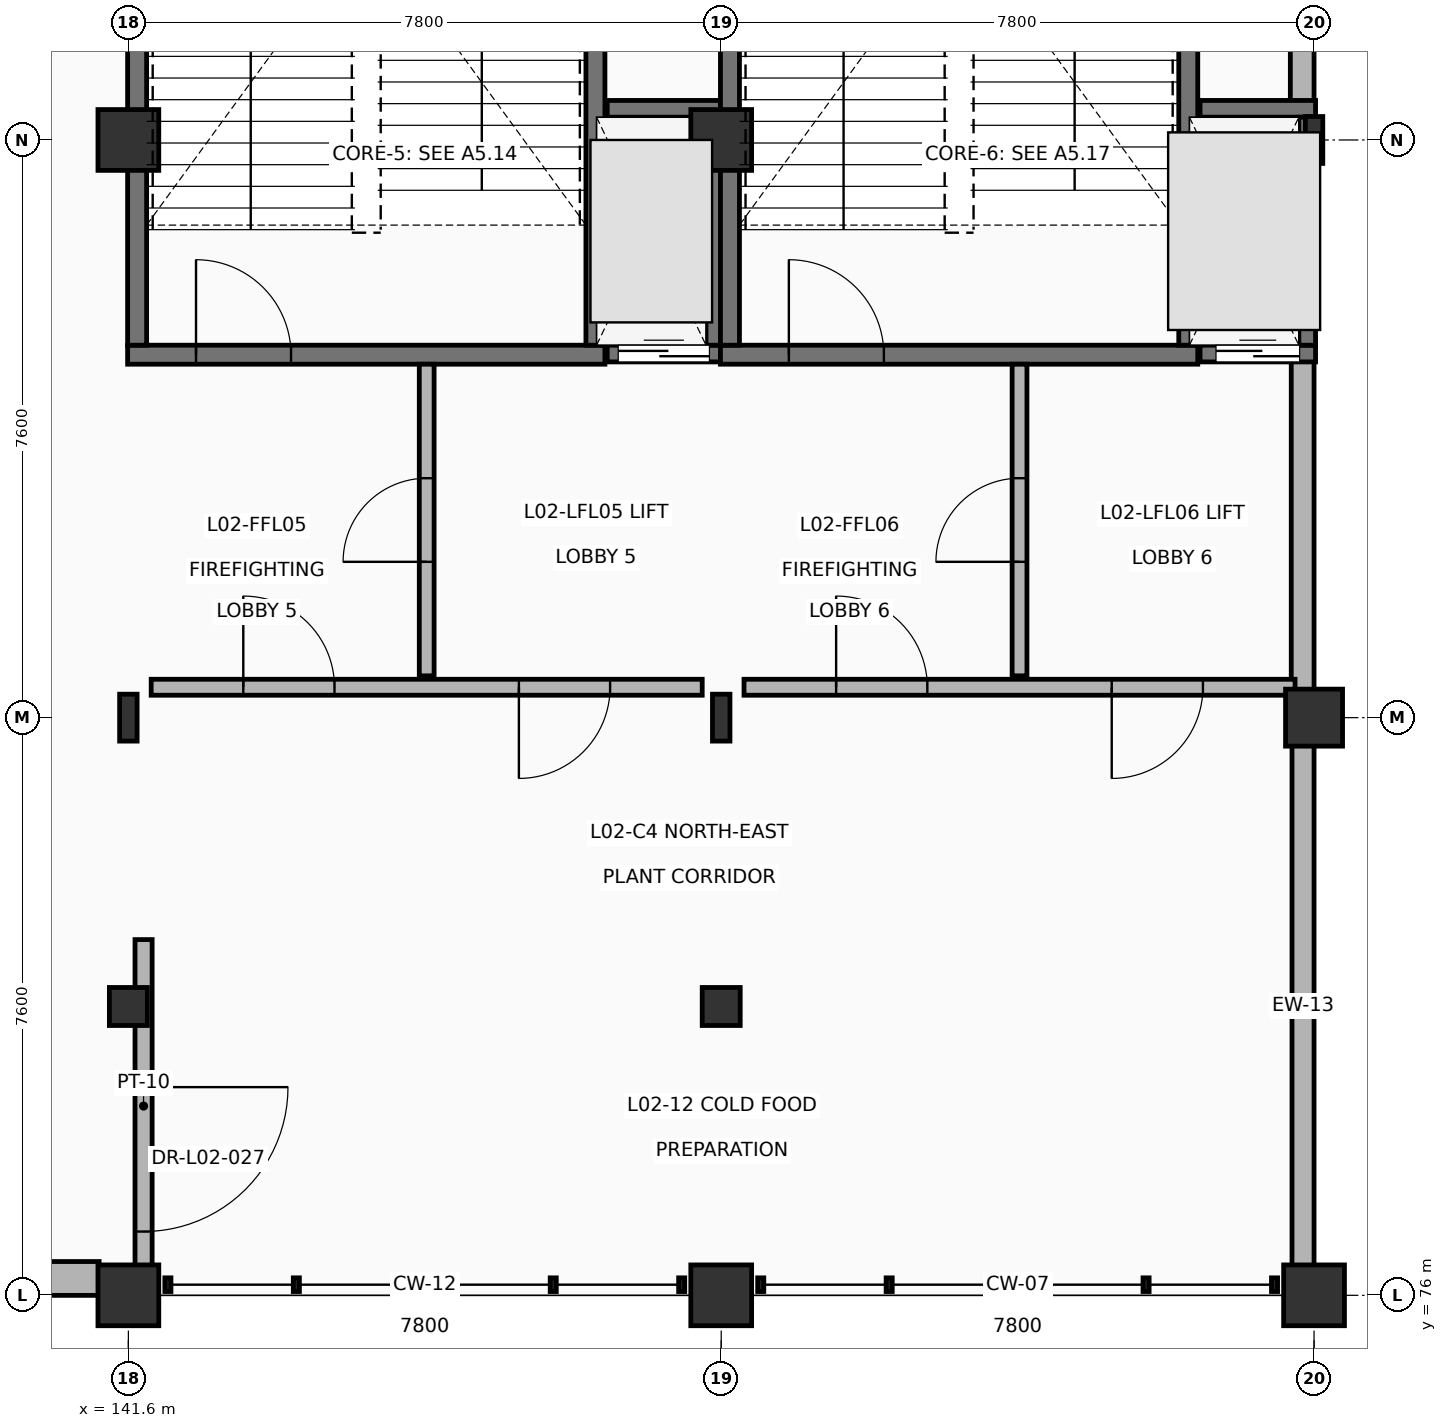
"""IFC4 building model, lengths in metres.
Left out: names, types, materials, properties, quantities, classifications, styles, units other than length and angle.
Written with IfcOpenShell. Run it as: python <this file> out.ifc"""

import sys

from ifc_helpers import new_model, si_unit, direction, frame, frame_2d, origin, origin_2d, place, context, subcontext, project, spatial, rectangle, circle, i_section, extrude, element, fill, save


model = new_model("IFC4")
c1 = context("Model", 3, precision=1e-05, world=origin(), true_north=direction((0.0, 1.0)))
c2 = subcontext(c1, "Body", "Model", "MODEL_VIEW")
j1 = project(units=[si_unit("LENGTHUNIT", "METRE"), si_unit("PLANEANGLEUNIT", "RADIAN")], contexts=[c1])
p1 = place(None, origin())
s1 = spatial("IfcSite", under=j1, at=p1, CompositionType="ELEMENT")
p2 = place(p1, origin())
s2 = spatial("IfcBuilding", under=s1, at=p2, CompositionType="ELEMENT")
p3 = place(p2, frame((0.0, 0.0, 5.4)))
s3 = spatial("IfcBuildingStorey", under=s2, at=p3, CompositionType="ELEMENT", Elevation=5.4)
p4 = place(p3, frame((141.6, 76.0, 0.0), z_axis=(0.0, 0.0, 1.0), x_axis=(1.0, 0.0, 0.0)))
e1 = element("IfcColumn", 1, at=p4, inside=s3, PredefinedType="COLUMN", context=c2, shape_type="SweptSolid", body=[
    extrude(rectangle(XDim=0.8, YDim=0.8, at=origin_2d()), origin(), (0.0, 0.0, 1.0), 5.1),
])
p5 = place(p3, frame((141.6, 83.6, 0.0), z_axis=(0.0, 0.0, 1.0), x_axis=(1.0, 0.0, 0.0)))
e2 = element("IfcColumn", 2, at=p5, inside=s3, PredefinedType="COLUMN", context=c2, shape_type="SweptSolid", body=[
    extrude(i_section(OverallWidth=0.23, OverallDepth=0.617, WebThickness=0.013, FlangeThickness=0.022, at=origin_2d()), origin(), (0.0, 0.0, 1.0), 5.1),
])
for number, where, z_axis, x_axis in (
    (3, (141.6, 91.2, 0.0), (0.0, 0.0, 1.0), (1.0, 0.0, 0.0)),
    (4, (149.4, 76.0, 0.0), (0.0, 0.0, 1.0), (1.0, 0.0, 0.0)),
):
    element("IfcColumn", number, at=place(p3, frame(where, z_axis=z_axis, x_axis=x_axis)), inside=s3, PredefinedType="COLUMN", context=c2, shape_type="SweptSolid", body=[
        extrude(rectangle(XDim=0.8, YDim=0.8, at=origin_2d()), origin(), (0.0, 0.0, 1.0), 5.1),
    ])
p6 = place(p3, frame((149.4, 83.6, 0.0), z_axis=(0.0, 0.0, 1.0), x_axis=(1.0, 0.0, 0.0)))
e5 = element("IfcColumn", 5, at=p6, inside=s3, PredefinedType="COLUMN", context=c2, shape_type="SweptSolid", body=[
    extrude(i_section(OverallWidth=0.23, OverallDepth=0.617, WebThickness=0.013, FlangeThickness=0.022, at=origin_2d()), origin(), (0.0, 0.0, 1.0), 5.1),
])
for number, where, z_axis, x_axis in (
    (6, (149.4, 91.2, 0.0), (0.0, 0.0, 1.0), (1.0, 0.0, 0.0)),
    (7, (157.2, 76.0, 0.0), (0.0, 0.0, 1.0), (1.0, 0.0, 0.0)),
):
    element("IfcColumn", number, at=place(p3, frame(where, z_axis=z_axis, x_axis=x_axis)), inside=s3, PredefinedType="COLUMN", context=c2, shape_type="SweptSolid", body=[
        extrude(rectangle(XDim=0.8, YDim=0.8, at=origin_2d()), origin(), (0.0, 0.0, 1.0), 5.1),
    ])
p7 = place(p3, frame((157.2, 83.6, 0.0), z_axis=(0.0, 0.0, 1.0), x_axis=(1.0, 0.0, 0.0)))
e8 = element("IfcColumn", 8, at=p7, inside=s3, PredefinedType="COLUMN", context=c2, shape_type="SweptSolid", body=[
    extrude(circle(Radius=0.375, at=origin_2d()), origin(), (0.0, 0.0, 1.0), 5.1),
])
p8 = place(p3, frame((157.2, 91.2, 0.0), z_axis=(0.0, 0.0, 1.0), x_axis=(1.0, 0.0, 0.0)))
e9 = element("IfcColumn", 9, at=p8, inside=s3, PredefinedType="COLUMN", context=c2, shape_type="SweptSolid", body=[
    extrude(i_section(OverallWidth=0.23, OverallDepth=0.617, WebThickness=0.013, FlangeThickness=0.022, at=origin_2d()), origin(), (0.0, 0.0, 1.0), 5.1),
])
for number, where, z_axis, x_axis in (
    (10, (141.6, 79.8, 0.0), (0.0, 0.0, 1.0), (1.0, 0.0, 0.0)),
    (11, (149.4, 79.8, 0.0), (0.0, 0.0, 1.0), (1.0, 0.0, 0.0)),
):
    element("IfcColumn", number, at=place(p3, frame(where, z_axis=z_axis, x_axis=x_axis)), inside=s3, PredefinedType="COLUMN", context=c2, shape_type="SweptSolid", body=[
        extrude(rectangle(XDim=0.5, YDim=0.5, at=origin_2d()), origin(), (0.0, 0.0, 1.0), 4.82),
    ])
p9 = place(p3, frame((157.044, 98.015, 0.0), z_axis=(0.0, 0.0, 1.0), x_axis=(0.0, -1.0, 0.0)))
e12 = element("IfcWall", 12, at=p9, inside=s3, PredefinedType="SOLIDWALL", context=c2, shape_type="SweptSolid", body=[
    extrude(rectangle(XDim=6.335, YDim=0.312, at=frame_2d((3.167, 0.0))), origin(), (0.0, 0.0, 1.0), 4.198),
])
p10 = place(p3, frame((157.05, 88.32, 0.0), z_axis=(0.0, 0.0, 1.0), x_axis=(0.0, -1.0, 0.0)))
e13 = element("IfcWall", 13, at=p10, inside=s3, PredefinedType="SOLIDWALL", context=c2, shape_type="SweptSolid", body=[
    extrude(rectangle(XDim=4.36, YDim=0.3, at=frame_2d((2.18, 0.0))), origin(), (0.0, 0.0, 1.0), 4.198),
])
p11 = place(p3, frame((157.055, 83.24, 0.0), z_axis=(0.0, 0.0, 1.0), x_axis=(0.0, -1.0, 0.0)))
e14 = element("IfcWall", 14, at=p11, inside=s3, PredefinedType="SOLIDWALL", context=c2, shape_type="SweptSolid", body=[
    extrude(rectangle(XDim=6.855, YDim=0.29, at=frame_2d((3.427, 0.0))), origin(), (0.0, 0.0, 1.0), 4.198),
])
p12 = place(p3, frame((141.215, 76.222, 0.0), z_axis=(0.0, 0.0, 1.0), x_axis=(-1.0, 0.0, 0.0)))
e15 = element("IfcWall", 15, at=p12, inside=s3, PredefinedType="SOLIDWALL", context=c2, shape_type="SweptSolid", body=[
    extrude(rectangle(XDim=7.03, YDim=0.445, at=frame_2d((3.515, 0.0))), origin(), (0.0, 0.0, 1.0), 4.565),
])
p13 = place(p12, frame((2.015, 0.0, 0.95)))
e16 = element("IfcOpeningElement", 16, at=p13, cuts=e15, PredefinedType="OPENING", context=c2, shape_type="SweptSolid", body=[
    extrude(rectangle(XDim=3.0, YDim=2.2, at=frame_2d((1.5, 1.1))), frame((0.0, 0.232, 0.0), z_axis=(0.0, -1.0, 0.0), x_axis=(1.0, 0.0, 0.0)), (0.0, 0.0, 1.0), 0.465),
])
p14 = place(p3, frame((141.59, 88.375, 0.0), z_axis=(0.0, 0.0, 1.0), x_axis=(1.0, 0.0, 0.0)))
e17 = element("IfcWall", 17, at=p14, inside=s3, PredefinedType="SHEAR", context=c2, shape_type="SweptSolid", body=[
    extrude(rectangle(XDim=6.28, YDim=0.25, at=frame_2d((3.14, 0.0))), origin(), (0.0, 0.0, 1.0), 4.82),
])
p15 = place(p14, frame((0.9, 0.0, 0.0)))
e18 = element("IfcOpeningElement", 18, at=p15, cuts=e17, PredefinedType="OPENING", context=c2, shape_type="SweptSolid", body=[
    extrude(rectangle(XDim=1.25, YDim=2.2, at=frame_2d((0.625, 1.1))), frame((0.0, 0.135, 0.0), z_axis=(0.0, -1.0, 0.0), x_axis=(1.0, 0.0, 0.0)), (0.0, 0.0, 1.0), 0.27),
])
for number, where, z_axis, x_axis in (
    (19, (141.715, 88.5, 0.0), (0.0, 0.0, 1.0), (0.0, 1.0, 0.0)),
    (20, (147.745, 88.5, 0.0), (0.0, 0.0, 1.0), (0.0, 1.0, 0.0)),
):
    element("IfcWall", number, at=place(p3, frame(where, z_axis=z_axis, x_axis=x_axis)), inside=s3, PredefinedType="SHEAR", context=c2, shape_type="SweptSolid", body=[
        extrude(rectangle(XDim=9.5, YDim=0.25, at=frame_2d((4.75, 0.0))), origin(), (0.0, 0.0, 1.0), 4.82),
    ])
p16 = place(p3, frame((147.9, 88.39, 0.0), z_axis=(0.0, 0.0, 1.0), x_axis=(1.0, 0.0, 0.0)))
e21 = element("IfcWall", 21, at=p16, inside=s3, PredefinedType="SHEAR", context=c2, shape_type="SweptSolid", body=[
    extrude(rectangle(XDim=1.49, YDim=0.22, at=frame_2d((0.745, 0.0))), origin(), (0.0, 0.0, 1.0), 4.82),
])
p17 = place(p16, frame((0.145, 0.0, 0.0)))
e22 = element("IfcOpeningElement", 22, at=p17, cuts=e21, PredefinedType="OPENING", context=c2, shape_type="SweptSolid", body=[
    extrude(rectangle(XDim=1.2, YDim=2.2, at=frame_2d((0.6, 1.1))), frame((0.0, 0.12, 0.0), z_axis=(0.0, -1.0, 0.0), x_axis=(1.0, 0.0, 0.0)), (0.0, 0.0, 1.0), 0.24),
])
p18 = place(p3, frame((147.9, 91.61, 0.0), z_axis=(0.0, 0.0, 1.0), x_axis=(1.0, 0.0, 0.0)))
e23 = element("IfcWall", 23, at=p18, inside=s3, PredefinedType="SHEAR", context=c2, shape_type="SweptSolid", body=[
    extrude(rectangle(XDim=1.49, YDim=0.22, at=frame_2d((0.745, 0.0))), origin(), (0.0, 0.0, 1.0), 4.82),
])
p19 = place(p3, frame((149.31, 88.5, 0.0), z_axis=(0.0, 0.0, 1.0), x_axis=(0.0, 1.0, 0.0)))
e24 = element("IfcWall", 24, at=p19, inside=s3, PredefinedType="SHEAR", context=c2, shape_type="SweptSolid", body=[
    extrude(rectangle(XDim=3.0, YDim=0.22, at=frame_2d((1.5, 0.0))), origin(), (0.0, 0.0, 1.0), 4.82),
])
p20 = place(p3, frame((141.9, 84.0, 0.0), z_axis=(0.0, 0.0, 1.0), x_axis=(1.0, 0.0, 0.0)))
e25 = element("IfcWall", 25, at=p20, inside=s3, PredefinedType="PARTITIONING", context=c2, shape_type="SweptSolid", body=[
    extrude(rectangle(XDim=7.25, YDim=0.21, at=frame_2d((3.625, 0.0))), origin(), (0.0, 0.0, 1.0), 4.82),
])
p21 = place(p20, frame((1.212, 0.0, 0.0)))
e26 = element("IfcOpeningElement", 26, at=p21, cuts=e25, PredefinedType="OPENING", context=c2, shape_type="SweptSolid", body=[
    extrude(rectangle(XDim=1.2, YDim=2.2, at=frame_2d((0.6, 1.1))), frame((0.0, 0.115, 0.0), z_axis=(0.0, -1.0, 0.0), x_axis=(1.0, 0.0, 0.0)), (0.0, 0.0, 1.0), 0.23),
])
p22 = place(p20, frame((4.838, 0.0, 0.0)))
e27 = element("IfcOpeningElement", 27, at=p22, cuts=e25, PredefinedType="OPENING", context=c2, shape_type="SweptSolid", body=[
    extrude(rectangle(XDim=1.2, YDim=2.2, at=frame_2d((0.6, 1.1))), frame((0.0, 0.115, 0.0), z_axis=(0.0, -1.0, 0.0), x_axis=(1.0, 0.0, 0.0)), (0.0, 0.0, 1.0), 0.23),
])
p23 = place(p3, frame((145.525, 84.15, 0.0), z_axis=(0.0, 0.0, 1.0), x_axis=(0.0, 1.0, 0.0)))
e28 = element("IfcWall", 28, at=p23, inside=s3, PredefinedType="PARTITIONING", context=c2, shape_type="SweptSolid", body=[
    extrude(rectangle(XDim=4.1, YDim=0.195, at=frame_2d((2.05, 0.0))), origin(), (0.0, 0.0, 1.0), 4.82),
])
p24 = place(p23, frame((1.5, 0.0, 0.0)))
e29 = element("IfcOpeningElement", 29, at=p24, cuts=e28, PredefinedType="OPENING", context=c2, shape_type="SweptSolid", body=[
    extrude(rectangle(XDim=1.1, YDim=2.15, at=frame_2d((0.55, 1.075))), frame((0.0, 0.107, 0.0), z_axis=(0.0, -1.0, 0.0), x_axis=(1.0, 0.0, 0.0)), (0.0, 0.0, 1.0), 0.215),
])
p25 = place(p3, frame((149.39, 88.375, 0.0), z_axis=(0.0, 0.0, 1.0), x_axis=(1.0, 0.0, 0.0)))
e30 = element("IfcWall", 30, at=p25, inside=s3, PredefinedType="SHEAR", context=c2, shape_type="SweptSolid", body=[
    extrude(rectangle(XDim=6.28, YDim=0.25, at=frame_2d((3.14, 0.0))), origin(), (0.0, 0.0, 1.0), 4.82),
])
p26 = place(p25, frame((0.9, 0.0, 0.0)))
e31 = element("IfcOpeningElement", 31, at=p26, cuts=e30, PredefinedType="OPENING", context=c2, shape_type="SweptSolid", body=[
    extrude(rectangle(XDim=1.25, YDim=2.2, at=frame_2d((0.625, 1.1))), frame((0.0, 0.135, 0.0), z_axis=(0.0, -1.0, 0.0), x_axis=(1.0, 0.0, 0.0)), (0.0, 0.0, 1.0), 0.27),
])
for number, where, z_axis, x_axis in (
    (32, (149.515, 88.5, 0.0), (0.0, 0.0, 1.0), (0.0, 1.0, 0.0)),
    (33, (155.545, 88.5, 0.0), (0.0, 0.0, 1.0), (0.0, 1.0, 0.0)),
):
    element("IfcWall", number, at=place(p3, frame(where, z_axis=z_axis, x_axis=x_axis)), inside=s3, PredefinedType="SHEAR", context=c2, shape_type="SweptSolid", body=[
        extrude(rectangle(XDim=9.5, YDim=0.25, at=frame_2d((4.75, 0.0))), origin(), (0.0, 0.0, 1.0), 4.82),
    ])
p27 = place(p3, frame((155.7, 88.39, 0.0), z_axis=(0.0, 0.0, 1.0), x_axis=(1.0, 0.0, 0.0)))
e34 = element("IfcWall", 34, at=p27, inside=s3, PredefinedType="SHEAR", context=c2, shape_type="SweptSolid", body=[
    extrude(rectangle(XDim=1.52, YDim=0.22, at=frame_2d((0.76, 0.0))), origin(), (0.0, 0.0, 1.0), 4.82),
])
p28 = place(p27, frame((0.21, 0.0, 0.0)))
e35 = element("IfcOpeningElement", 35, at=p28, cuts=e34, PredefinedType="OPENING", context=c2, shape_type="SweptSolid", body=[
    extrude(rectangle(XDim=1.1, YDim=2.15, at=frame_2d((0.55, 1.075))), frame((0.0, 0.12, 0.0), z_axis=(0.0, -1.0, 0.0), x_axis=(1.0, 0.0, 0.0)), (0.0, 0.0, 1.0), 0.24),
])
p29 = place(p3, frame((155.7, 91.61, 0.0), z_axis=(0.0, 0.0, 1.0), x_axis=(1.0, 0.0, 0.0)))
e36 = element("IfcWall", 36, at=p29, inside=s3, PredefinedType="SHEAR", context=c2, shape_type="SweptSolid", body=[
    extrude(rectangle(XDim=1.52, YDim=0.22, at=frame_2d((0.76, 0.0))), origin(), (0.0, 0.0, 1.0), 4.82),
])
p30 = place(p3, frame((157.11, 88.5, 0.0), z_axis=(0.0, 0.0, 1.0), x_axis=(0.0, 1.0, 0.0)))
e37 = element("IfcWall", 37, at=p30, inside=s3, PredefinedType="SHEAR", context=c2, shape_type="SweptSolid", body=[
    extrude(rectangle(XDim=3.0, YDim=0.22, at=frame_2d((1.5, 0.0))), origin(), (0.0, 0.0, 1.0), 4.82),
])
p31 = place(p3, frame((149.7, 84.0, 0.0), z_axis=(0.0, 0.0, 1.0), x_axis=(1.0, 0.0, 0.0)))
e38 = element("IfcWall", 38, at=p31, inside=s3, PredefinedType="PARTITIONING", context=c2, shape_type="SweptSolid", body=[
    extrude(rectangle(XDim=7.25, YDim=0.21, at=frame_2d((3.625, 0.0))), origin(), (0.0, 0.0, 1.0), 4.82),
])
p32 = place(p31, frame((1.212, 0.0, 0.0)))
e39 = element("IfcOpeningElement", 39, at=p32, cuts=e38, PredefinedType="OPENING", context=c2, shape_type="SweptSolid", body=[
    extrude(rectangle(XDim=1.2, YDim=2.2, at=frame_2d((0.6, 1.1))), frame((0.0, 0.115, 0.0), z_axis=(0.0, -1.0, 0.0), x_axis=(1.0, 0.0, 0.0)), (0.0, 0.0, 1.0), 0.23),
])
p33 = place(p31, frame((4.838, 0.0, 0.0)))
e40 = element("IfcOpeningElement", 40, at=p33, cuts=e38, PredefinedType="OPENING", context=c2, shape_type="SweptSolid", body=[
    extrude(rectangle(XDim=1.2, YDim=2.2, at=frame_2d((0.6, 1.1))), frame((0.0, 0.115, 0.0), z_axis=(0.0, -1.0, 0.0), x_axis=(1.0, 0.0, 0.0)), (0.0, 0.0, 1.0), 0.23),
])
p34 = place(p3, frame((153.325, 84.15, 0.0), z_axis=(0.0, 0.0, 1.0), x_axis=(0.0, 1.0, 0.0)))
e41 = element("IfcWall", 41, at=p34, inside=s3, PredefinedType="PARTITIONING", context=c2, shape_type="SweptSolid", body=[
    extrude(rectangle(XDim=4.1, YDim=0.195, at=frame_2d((2.05, 0.0))), origin(), (0.0, 0.0, 1.0), 4.82),
])
p35 = place(p34, frame((1.5, 0.0, 0.0)))
e42 = element("IfcOpeningElement", 42, at=p35, cuts=e41, PredefinedType="OPENING", context=c2, shape_type="SweptSolid", body=[
    extrude(rectangle(XDim=1.1, YDim=2.15, at=frame_2d((0.55, 1.075))), frame((0.0, 0.107, 0.0), z_axis=(0.0, -1.0, 0.0), x_axis=(1.0, 0.0, 0.0)), (0.0, 0.0, 1.0), 0.215),
])
p36 = place(p3, frame((141.8, 80.68, 0.0), z_axis=(0.0, 0.0, 1.0), x_axis=(0.0, -1.0, 0.0)))
e43 = element("IfcWall", 43, at=p36, inside=s3, PredefinedType="PARTITIONING", context=c2, shape_type="SweptSolid", body=[
    extrude(rectangle(XDim=4.38, YDim=0.225, at=frame_2d((2.19, 0.0))), origin(), (0.0, 0.0, 1.0), 4.198),
])
p37 = place(p36, frame((1.941, 0.0, 0.0)))
e44 = element("IfcOpeningElement", 44, at=p37, cuts=e43, PredefinedType="OPENING", context=c2, shape_type="SweptSolid", body=[
    extrude(rectangle(XDim=1.9, YDim=2.4, at=frame_2d((0.95, 1.2))), frame((0.0, 0.123, 0.0), z_axis=(0.0, -1.0, 0.0), x_axis=(1.0, 0.0, 0.0)), (0.0, 0.0, 1.0), 0.245),
])
p38 = place(p15, origin())
e45 = element("IfcDoor", 45, at=p38, inside=s3, OperationType="SINGLE_SWING_LEFT", PredefinedType="DOOR", context=c2, shape_type="SweptSolid", body=[
    extrude(rectangle(XDim=1.25, YDim=2.2, at=frame_2d((0.625, 1.1))), frame((0.0, 0.025, 0.0), z_axis=(0.0, -1.0, 0.0), x_axis=(1.0, 0.0, 0.0)), (0.0, 0.0, 1.0), 0.05),
])
fill(e18, e45)
p39 = place(p17, origin())
e46 = element("IfcDoor", 46, at=p39, inside=s3, OperationType="DOUBLE_DOOR_SLIDING", PredefinedType="DOOR", context=c2, shape_type="SweptSolid", body=[
    extrude(rectangle(XDim=1.2, YDim=2.2, at=frame_2d((0.6, 1.1))), frame((0.0, 0.025, 0.0), z_axis=(0.0, -1.0, 0.0), x_axis=(1.0, 0.0, 0.0)), (0.0, 0.0, 1.0), 0.05),
])
fill(e22, e46)
p40 = place(p21, origin())
e47 = element("IfcDoor", 47, at=p40, inside=s3, OperationType="SINGLE_SWING_LEFT", PredefinedType="DOOR", context=c2, shape_type="SweptSolid", body=[
    extrude(rectangle(XDim=1.2, YDim=2.2, at=frame_2d((0.6, 1.1))), frame((0.0, 0.025, 0.0), z_axis=(0.0, -1.0, 0.0), x_axis=(1.0, 0.0, 0.0)), (0.0, 0.0, 1.0), 0.05),
])
fill(e26, e47)
p41 = place(p22, origin())
e48 = element("IfcDoor", 48, at=p41, inside=s3, OperationType="SINGLE_SWING_RIGHT", PredefinedType="DOOR", context=c2, shape_type="SweptSolid", body=[
    extrude(rectangle(XDim=1.2, YDim=2.2, at=frame_2d((0.6, 1.1))), frame((0.0, 0.025, 0.0), z_axis=(0.0, -1.0, 0.0), x_axis=(1.0, 0.0, 0.0)), (0.0, 0.0, 1.0), 0.05),
])
fill(e27, e48)
p42 = place(p24, origin())
e49 = element("IfcDoor", 49, at=p42, inside=s3, OperationType="SINGLE_SWING_LEFT", PredefinedType="DOOR", context=c2, shape_type="SweptSolid", body=[
    extrude(rectangle(XDim=1.1, YDim=2.15, at=frame_2d((0.55, 1.075))), frame((0.0, 0.025, 0.0), z_axis=(0.0, -1.0, 0.0), x_axis=(1.0, 0.0, 0.0)), (0.0, 0.0, 1.0), 0.05),
])
fill(e29, e49)
p43 = place(p26, origin())
e50 = element("IfcDoor", 50, at=p43, inside=s3, OperationType="SINGLE_SWING_LEFT", PredefinedType="DOOR", context=c2, shape_type="SweptSolid", body=[
    extrude(rectangle(XDim=1.25, YDim=2.2, at=frame_2d((0.625, 1.1))), frame((0.0, 0.025, 0.0), z_axis=(0.0, -1.0, 0.0), x_axis=(1.0, 0.0, 0.0)), (0.0, 0.0, 1.0), 0.05),
])
fill(e31, e50)
p44 = place(p28, origin())
e51 = element("IfcDoor", 51, at=p44, inside=s3, OperationType="DOUBLE_DOOR_SLIDING", PredefinedType="DOOR", context=c2, shape_type="SweptSolid", body=[
    extrude(rectangle(XDim=1.1, YDim=2.15, at=frame_2d((0.55, 1.075))), frame((0.0, 0.025, 0.0), z_axis=(0.0, -1.0, 0.0), x_axis=(1.0, 0.0, 0.0)), (0.0, 0.0, 1.0), 0.05),
])
fill(e35, e51)
p45 = place(p32, origin())
e52 = element("IfcDoor", 52, at=p45, inside=s3, OperationType="SINGLE_SWING_LEFT", PredefinedType="DOOR", context=c2, shape_type="SweptSolid", body=[
    extrude(rectangle(XDim=1.2, YDim=2.2, at=frame_2d((0.6, 1.1))), frame((0.0, 0.025, 0.0), z_axis=(0.0, -1.0, 0.0), x_axis=(1.0, 0.0, 0.0)), (0.0, 0.0, 1.0), 0.05),
])
fill(e39, e52)
p46 = place(p33, origin())
e53 = element("IfcDoor", 53, at=p46, inside=s3, OperationType="SINGLE_SWING_RIGHT", PredefinedType="DOOR", context=c2, shape_type="SweptSolid", body=[
    extrude(rectangle(XDim=1.2, YDim=2.2, at=frame_2d((0.6, 1.1))), frame((0.0, 0.025, 0.0), z_axis=(0.0, -1.0, 0.0), x_axis=(1.0, 0.0, 0.0)), (0.0, 0.0, 1.0), 0.05),
])
fill(e40, e53)
p47 = place(p35, origin())
e54 = element("IfcDoor", 54, at=p47, inside=s3, OperationType="SINGLE_SWING_LEFT", PredefinedType="DOOR", context=c2, shape_type="SweptSolid", body=[
    extrude(rectangle(XDim=1.1, YDim=2.15, at=frame_2d((0.55, 1.075))), frame((0.0, 0.025, 0.0), z_axis=(0.0, -1.0, 0.0), x_axis=(1.0, 0.0, 0.0)), (0.0, 0.0, 1.0), 0.05),
])
fill(e42, e54)
p48 = place(p37, origin())
e55 = element("IfcDoor", 55, at=p48, inside=s3, OperationType="DOUBLE_DOOR_SINGLE_SWING", PredefinedType="DOOR", context=c2, shape_type="SweptSolid", body=[
    extrude(rectangle(XDim=1.9, YDim=2.4, at=frame_2d((0.95, 1.2))), frame((0.0, 0.025, 0.0), z_axis=(0.0, -1.0, 0.0), x_axis=(1.0, 0.0, 0.0)), (0.0, 0.0, 1.0), 0.05),
])
fill(e44, e55)
save(model, sys.argv[1])
